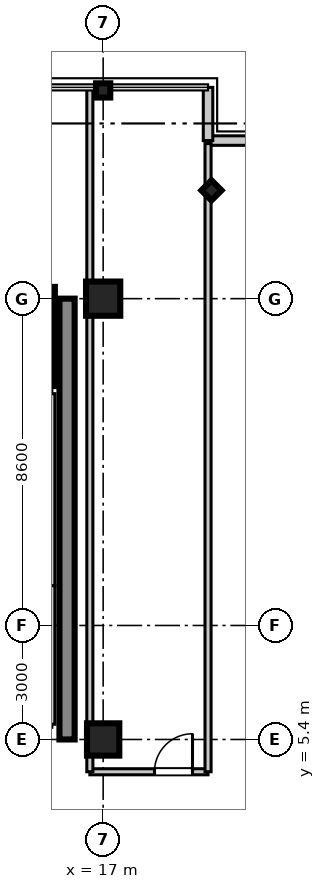
"""IFC4 building model, lengths in metres.
Left out: names, types, materials, properties, quantities, classifications, styles, units other than length and angle.
Written with IfcOpenShell. Run it as: python <this file> out.ifc"""

import sys

from ifc_helpers import new_model, si_unit, direction, frame, frame_2d, origin, origin_2d, place, context, subcontext, project, spatial, rectangle, i_section, extrude, source, transform, mapped, element, fill, save


model = new_model("IFC4")
c1 = context("Model", 3, precision=1e-05, world=origin(), true_north=direction((0.0, 1.0)))
c2 = subcontext(c1, "Body", "Model", "MODEL_VIEW")
j1 = project(units=[si_unit("LENGTHUNIT", "METRE"), si_unit("PLANEANGLEUNIT", "RADIAN")], contexts=[c1])
p1 = place(None, origin())
s1 = spatial("IfcSite", under=j1, at=p1, CompositionType="ELEMENT")
p2 = place(p1, origin())
s2 = spatial("IfcBuilding", under=s1, at=p2, CompositionType="ELEMENT")
p3 = place(p2, frame((0.0, 0.0, 327.15)))
s3 = spatial("IfcBuildingStorey", under=s2, at=p3, CompositionType="ELEMENT", Elevation=327.15)
m1 = source(origin(), c2, "Body", "SweptSolid", [
    extrude(rectangle(XDim=0.85, YDim=0.85, at=origin_2d()), origin(), (0.0, 0.0, 1.0), 3.755),
])
p4 = place(p3, frame((17.0, 5.4, 0.0), z_axis=(0.0, 0.0, 1.0), x_axis=(1.0, 0.0, 0.0)))
e1 = element("IfcColumn", 1, at=p4, inside=s3, PredefinedType="PILASTER", context=c2, shape_type="MappedRepresentation", body=[
    mapped(m1, transform((0.0, 0.0, 0.0), scale=1.0)),
])
m2 = source(origin(), c2, "Body", "SweptSolid", [
    extrude(rectangle(XDim=0.9, YDim=0.9, at=origin_2d()), origin(), (0.0, 0.0, 1.0), 3.755),
])
p5 = place(p3, frame((17.0, 17.0, 0.0), z_axis=(0.0, 0.0, 1.0), x_axis=(1.0, 0.0, 0.0)))
e2 = element("IfcColumn", 2, at=p5, inside=s3, PredefinedType="COLUMN", context=c2, shape_type="MappedRepresentation", body=[
    mapped(m2, transform((0.0, 0.0, 0.0), scale=1.0)),
])
m3 = source(origin(), c2, "Body", "SweptSolid", [
    extrude(i_section(OverallWidth=0.374, OverallDepth=0.374, WebThickness=0.014, FlangeThickness=0.023, at=origin_2d()), origin(), (0.0, 0.0, 1.0), 3.755),
])
for number, where, z_axis, x_axis in (
    (3, (17.0, 22.48, 0.0), (0.0, 0.0, 1.0), (0.0, 1.0, 0.0)),
    (4, (19.85, 19.85, 0.0), (0.0, 0.0, 1.0), (0.707, 0.707, 0.0)),
):
    element("IfcColumn", number, at=place(p3, frame(where, z_axis=z_axis, x_axis=x_axis)), inside=s3, PredefinedType="COLUMN", context=c2, shape_type="MappedRepresentation", body=[
        mapped(m3, transform((0.0, 0.0, 0.0), scale=1.0)),
    ])
m4 = source(origin(), c2, "Body", "SweptSolid", [
    extrude(rectangle(XDim=11.6, YDim=0.4, at=frame_2d((5.8, 0.0))), origin(), (0.0, 0.0, 1.0), 3.5),
])
p6 = place(p3, frame((16.05, 5.4, 0.0), z_axis=(0.0, 0.0, 1.0), x_axis=(0.0, 1.0, 0.0)))
e5 = element("IfcWall", 5, at=p6, inside=s3, PredefinedType="SHEAR", context=c2, shape_type="MappedRepresentation", body=[
    mapped(m4, transform((0.0, 0.0, 0.0), scale=1.0)),
])
m5 = source(origin(), c2, "Body", "SweptSolid", [
    extrude(rectangle(XDim=2.61, YDim=0.22, at=frame_2d((1.305, 0.0))), origin(), (0.0, 0.0, 1.0), 3.5),
])
p7 = place(p3, frame((15.62, 14.7, 0.0), z_axis=(0.0, 0.0, 1.0), x_axis=(0.0, 1.0, 0.0)))
e6 = element("IfcWall", 6, at=p7, inside=s3, PredefinedType="SHEAR", context=c2, shape_type="MappedRepresentation", body=[
    mapped(m5, transform((0.0, 0.0, 0.0), scale=1.0)),
])
m6 = source(origin(), c2, "Body", "SweptSolid", [
    extrude(rectangle(XDim=1.4, YDim=0.25, at=frame_2d((0.7, 0.0))), origin(), (0.0, 0.0, 1.0), 3.5),
])
p8 = place(p3, frame((19.76, 21.16, 0.0), z_axis=(0.0, 0.0, 1.0), x_axis=(1.0, 0.0, 0.0)))
e7 = element("IfcWall", 7, at=p8, inside=s3, PredefinedType="STANDARD", context=c2, shape_type="MappedRepresentation", body=[
    mapped(m6, transform((0.0, 0.0, 0.0), scale=1.0)),
])
m7 = source(origin(), c2, "Body", "SweptSolid", [
    extrude(rectangle(XDim=1.4, YDim=0.25, at=frame_2d((0.7, 0.0))), origin(), (0.0, 0.0, 1.0), 3.5),
])
p9 = place(p3, frame((19.76, 21.16, 0.0), z_axis=(0.0, 0.0, 1.0), x_axis=(0.0, 1.0, 0.0)))
e8 = element("IfcWall", 8, at=p9, inside=s3, PredefinedType="STANDARD", context=c2, shape_type="MappedRepresentation", body=[
    mapped(m7, transform((0.0, 0.0, 0.0), scale=1.0)),
])
m8 = source(origin(), c2, "Body", "SweptSolid", [
    extrude(rectangle(XDim=3.65, YDim=0.16, at=frame_2d((1.825, 0.0))), origin(), (0.0, 0.0, 1.0), 2.84),
])
p10 = place(p3, frame((15.65, 5.8, 0.0), z_axis=(0.0, 0.0, 1.0), x_axis=(0.0, 1.0, 0.0)))
e9 = element("IfcWall", 9, at=p10, inside=s3, PredefinedType="PARTITIONING", context=c2, shape_type="MappedRepresentation", body=[
    mapped(m8, transform((0.0, 0.0, 0.0), scale=1.0)),
])
m9 = source(origin(), c2, "Body", "SweptSolid", [
    extrude(rectangle(XDim=5.05, YDim=0.16, at=frame_2d((2.525, 0.0))), origin(), (0.0, 0.0, 1.0), 2.84),
])
p11 = place(p3, frame((15.65, 9.45, 0.0), z_axis=(0.0, 0.0, 1.0), x_axis=(0.0, 1.0, 0.0)))
e10 = element("IfcWall", 10, at=p11, inside=s3, PredefinedType="PARTITIONING", context=c2, shape_type="MappedRepresentation", body=[
    mapped(m9, transform((0.0, 0.0, 0.0), scale=1.0)),
])
m10 = source(origin(), c2, "Body", "SweptSolid", [
    extrude(rectangle(XDim=3.11, YDim=0.16, at=frame_2d((1.555, 0.0))), origin(), (0.0, 0.0, 1.0), 2.84),
])
p12 = place(p3, frame((16.65, 4.55, 0.0), z_axis=(0.0, 0.0, 1.0), x_axis=(1.0, 0.0, 0.0)))
e11 = element("IfcWall", 11, at=p12, inside=s3, PredefinedType="PARTITIONING", context=c2, shape_type="MappedRepresentation", body=[
    mapped(m10, transform((0.0, 0.0, 0.0), scale=1.0)),
])
p13 = place(p12, frame((1.701, 0.0, 0.0)))
e12 = element("IfcOpeningElement", 12, at=p13, cuts=e11, PredefinedType="OPENING", context=c2, shape_type="SweptSolid", body=[
    extrude(rectangle(XDim=1.0, YDim=2.1, at=frame_2d((0.5, 1.05))), frame((0.0, 0.09, 0.0), z_axis=(0.0, -1.0, 0.0), x_axis=(1.0, 0.0, 0.0)), (0.0, 0.0, 1.0), 0.18),
])
m11 = source(origin(), c2, "Body", "SweptSolid", [
    extrude(rectangle(XDim=17.95, YDim=0.16, at=frame_2d((8.975, 0.0))), origin(), (0.0, 0.0, 1.0), 2.84),
])
p14 = place(p3, frame((16.65, 4.55, 0.0), z_axis=(0.0, 0.0, 1.0), x_axis=(0.0, 1.0, 0.0)))
e13 = element("IfcWall", 13, at=p14, inside=s3, PredefinedType="PARTITIONING", context=c2, shape_type="MappedRepresentation", body=[
    mapped(m11, transform((0.0, 0.0, 0.0), scale=1.0)),
])
m12 = source(origin(), c2, "Body", "SweptSolid", [
    extrude(rectangle(XDim=16.53, YDim=0.16, at=frame_2d((8.265, 0.0))), origin(), (0.0, 0.0, 1.0), 2.84),
])
p15 = place(p3, frame((19.76, 4.55, 0.0), z_axis=(0.0, 0.0, 1.0), x_axis=(0.0, 1.0, 0.0)))
e14 = element("IfcWall", 14, at=p15, inside=s3, PredefinedType="PARTITIONING", context=c2, shape_type="MappedRepresentation", body=[
    mapped(m12, transform((0.0, 0.0, 0.0), scale=1.0)),
])
m13 = source(origin(), c2, "Body", "SweptSolid", [
    extrude(rectangle(XDim=1.0, YDim=2.1, at=frame_2d((0.5, 1.05))), frame((0.0, 0.025, 0.0), z_axis=(0.0, -1.0, 0.0), x_axis=(1.0, 0.0, 0.0)), (0.0, 0.0, 1.0), 0.05),
])
p16 = place(p13, origin())
e15 = element("IfcDoor", 15, at=p16, inside=s3, OperationType="SINGLE_SWING_RIGHT", PredefinedType="DOOR", context=c2, shape_type="MappedRepresentation", body=[
    mapped(m13, transform((0.0, 0.0, 0.0), scale=1.0)),
])
fill(e12, e15)
save(model, sys.argv[1])
